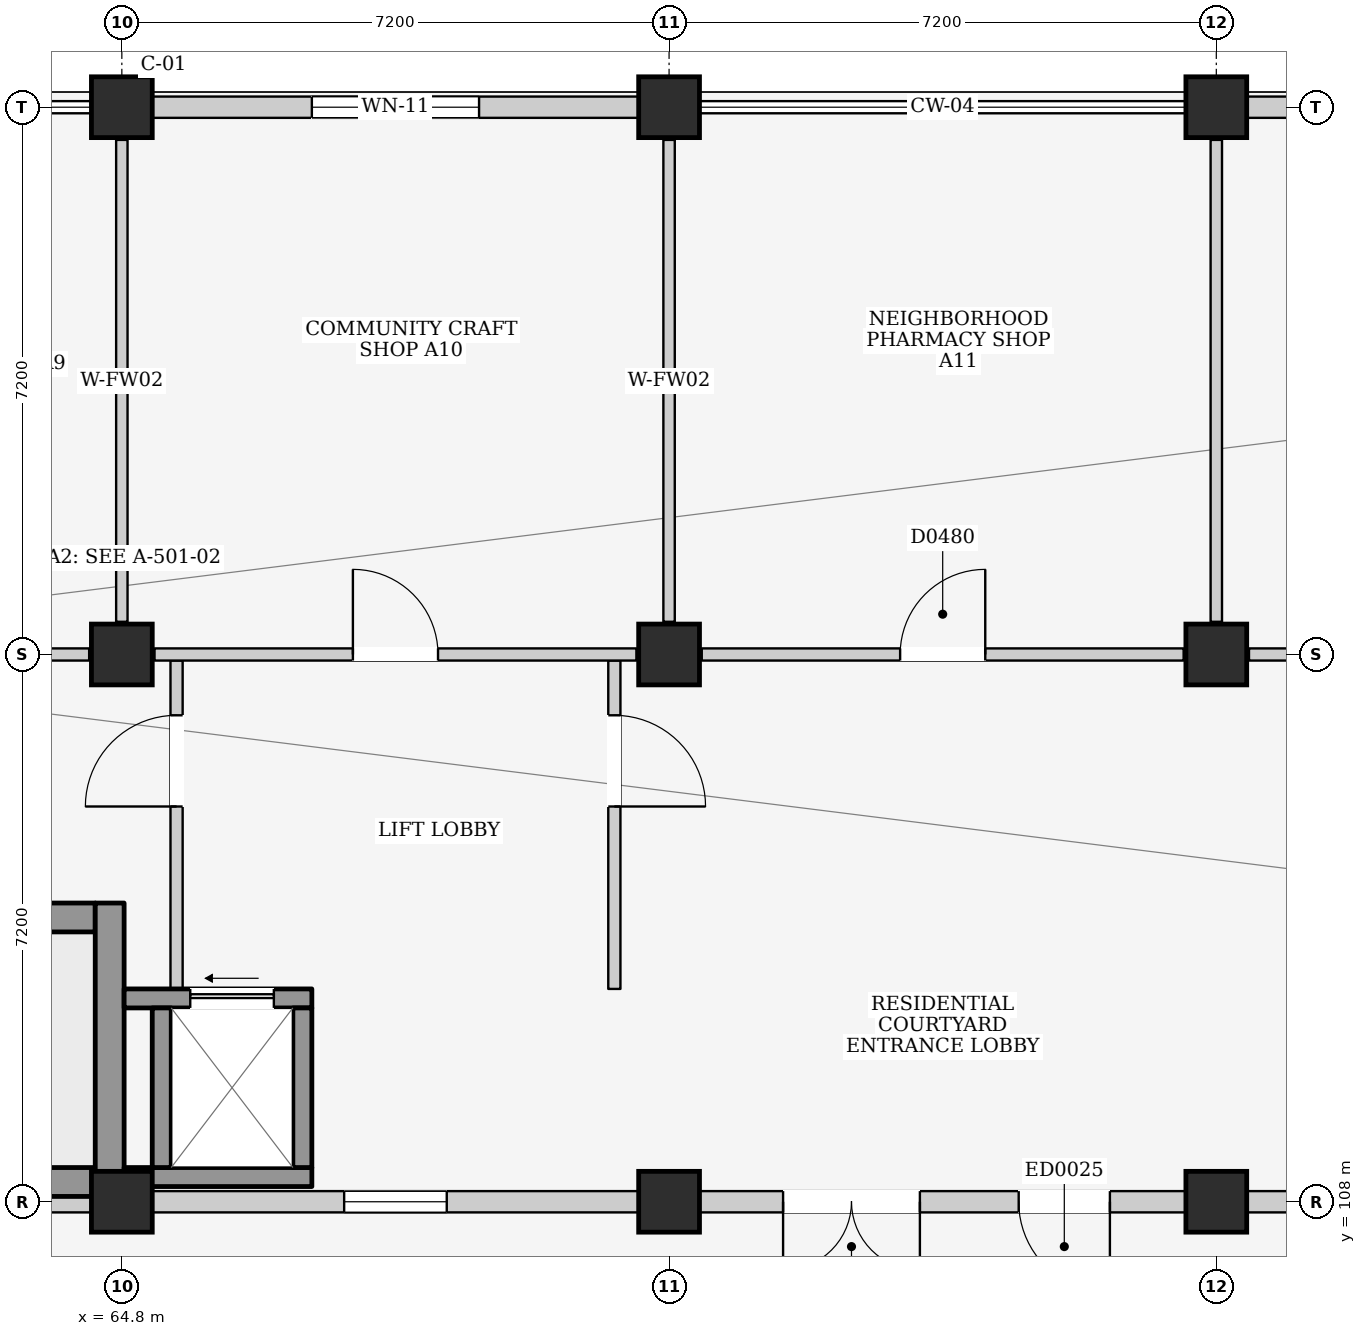
"""IFC4 building model, lengths in metres.
Left out: names, types, materials, properties, quantities, classifications, styles, units other than length and angle.
Written with IfcOpenShell. Run it as: python <this file> out.ifc"""

import sys

from ifc_helpers import new_model, si_unit, direction, frame, frame_2d, origin, origin_2d, place, context, subcontext, project, spatial, rectangle, extrude, element, fill, save


model = new_model("IFC4")
c1 = context("Model", 3, precision=1e-05, world=origin(), true_north=direction((0.0, 1.0)))
c2 = subcontext(c1, "Body", "Model", "MODEL_VIEW")
j1 = project(units=[si_unit("LENGTHUNIT", "METRE"), si_unit("PLANEANGLEUNIT", "RADIAN")], contexts=[c1])
p1 = place(None, origin())
s1 = spatial("IfcSite", under=j1, at=p1, CompositionType="ELEMENT")
p2 = place(p1, origin())
s2 = spatial("IfcBuilding", under=s1, at=p2, CompositionType="ELEMENT")
p3 = place(p2, origin())
s3 = spatial("IfcBuildingStorey", under=s2, at=p3, CompositionType="ELEMENT", Elevation=0.0)
for number, where, z_axis, x_axis in (
    (1, (64.8, 108.0, 0.0), (0.0, 0.0, 1.0), (1.0, 0.0, 0.0)),
    (2, (64.8, 115.2, 0.0), (0.0, 0.0, 1.0), (1.0, 0.0, 0.0)),
    (3, (64.8, 122.4, 0.0), (0.0, 0.0, 1.0), (1.0, 0.0, 0.0)),
    (4, (72.0, 108.0, 0.0), (0.0, 0.0, 1.0), (1.0, 0.0, 0.0)),
    (5, (72.0, 115.2, 0.0), (0.0, 0.0, 1.0), (1.0, 0.0, 0.0)),
    (6, (72.0, 122.4, 0.0), (0.0, 0.0, 1.0), (1.0, 0.0, 0.0)),
    (7, (79.2, 108.0, 0.0), (0.0, 0.0, 1.0), (1.0, 0.0, 0.0)),
    (8, (79.2, 115.2, 0.0), (0.0, 0.0, 1.0), (1.0, 0.0, 0.0)),
    (9, (79.2, 122.4, 0.0), (0.0, 0.0, 1.0), (1.0, 0.0, 0.0)),
):
    element("IfcColumn", number, at=place(p3, frame(where, z_axis=z_axis, x_axis=x_axis)), inside=s3, PredefinedType="COLUMN", context=c2, shape_type="SweptSolid", body=[
        extrude(rectangle(XDim=0.8, YDim=0.8, at=origin_2d()), origin(), (0.0, 0.0, 1.0), 4.5),
    ])
p4 = place(p3, frame((58.0, 108.0, 0.0), z_axis=(0.0, 0.0, 1.0), x_axis=(1.0, 0.0, 0.0)))
e10 = element("IfcWall", 10, at=p4, inside=s3, PredefinedType="ELEMENTEDWALL", context=c2, shape_type="SweptSolid", body=[
    extrude(rectangle(XDim=6.4, YDim=0.28, at=frame_2d((3.2, 0.0))), origin(), (0.0, 0.0, 1.0), 3.435),
])
p5 = place(p4, frame((2.525, 0.0, 0.95)))
e11 = element("IfcOpeningElement", 11, at=p5, cuts=e10, PredefinedType="OPENING", context=c2, shape_type="SweptSolid", body=[
    extrude(rectangle(XDim=1.35, YDim=1.5, at=frame_2d((0.675, 0.75))), frame((0.0, 0.155, 0.0), z_axis=(0.0, -1.0, 0.0), x_axis=(1.0, 0.0, 0.0)), (0.0, 0.0, 1.0), 0.31),
])
p6 = place(p3, frame((65.2, 122.4, 0.0), z_axis=(0.0, 0.0, 1.0), x_axis=(1.0, 0.0, 0.0)))
e12 = element("IfcWall", 12, at=p6, inside=s3, PredefinedType="ELEMENTEDWALL", context=c2, shape_type="SweptSolid", body=[
    extrude(rectangle(XDim=6.4, YDim=0.28, at=frame_2d((3.2, 0.0))), origin(), (0.0, 0.0, 1.0), 3.665),
])
p7 = place(p6, frame((2.1, 0.0, 0.85)))
e13 = element("IfcOpeningElement", 13, at=p7, cuts=e12, PredefinedType="OPENING", context=c2, shape_type="SweptSolid", body=[
    extrude(rectangle(XDim=2.2, YDim=1.8, at=frame_2d((1.1, 0.9))), frame((0.0, 0.155, 0.0), z_axis=(0.0, -1.0, 0.0), x_axis=(1.0, 0.0, 0.0)), (0.0, 0.0, 1.0), 0.31),
])
p8 = place(p3, frame((65.2, 108.0, 0.0), z_axis=(0.0, 0.0, 1.0), x_axis=(1.0, 0.0, 0.0)))
e14 = element("IfcWall", 14, at=p8, inside=s3, PredefinedType="ELEMENTEDWALL", context=c2, shape_type="SweptSolid", body=[
    extrude(rectangle(XDim=6.4, YDim=0.28, at=frame_2d((3.2, 0.0))), origin(), (0.0, 0.0, 1.0), 3.435),
])
p9 = place(p8, frame((2.525, 0.0, 0.95)))
e15 = element("IfcOpeningElement", 15, at=p9, cuts=e14, PredefinedType="OPENING", context=c2, shape_type="SweptSolid", body=[
    extrude(rectangle(XDim=1.35, YDim=1.5, at=frame_2d((0.675, 0.75))), frame((0.0, 0.155, 0.0), z_axis=(0.0, -1.0, 0.0), x_axis=(1.0, 0.0, 0.0)), (0.0, 0.0, 1.0), 0.31),
])
p10 = place(p3, frame((72.4, 108.0, 0.0), z_axis=(0.0, 0.0, 1.0), x_axis=(1.0, 0.0, 0.0)))
e16 = element("IfcWall", 16, at=p10, inside=s3, PredefinedType="ELEMENTEDWALL", context=c2, shape_type="SweptSolid", body=[
    extrude(rectangle(XDim=6.4, YDim=0.28, at=frame_2d((3.2, 0.0))), origin(), (0.0, 0.0, 1.0), 3.435),
])
p11 = place(p10, frame((1.1, 0.0, 0.0)))
e17 = element("IfcOpeningElement", 17, at=p11, cuts=e16, PredefinedType="OPENING", context=c2, shape_type="SweptSolid", body=[
    extrude(rectangle(XDim=1.8, YDim=2.4, at=frame_2d((0.9, 1.2))), frame((0.0, 0.155, 0.0), z_axis=(0.0, -1.0, 0.0), x_axis=(1.0, 0.0, 0.0)), (0.0, 0.0, 1.0), 0.31),
])
p12 = place(p10, frame((4.2, 0.0, 0.0)))
e18 = element("IfcOpeningElement", 18, at=p12, cuts=e16, PredefinedType="OPENING", context=c2, shape_type="SweptSolid", body=[
    extrude(rectangle(XDim=1.2, YDim=2.15, at=frame_2d((0.6, 1.075))), frame((0.0, 0.155, 0.0), z_axis=(0.0, -1.0, 0.0), x_axis=(1.0, 0.0, 0.0)), (0.0, 0.0, 1.0), 0.31),
])
p13 = place(p3, frame((79.6, 122.4, 0.0), z_axis=(0.0, 0.0, 1.0), x_axis=(1.0, 0.0, 0.0)))
e19 = element("IfcWall", 19, at=p13, inside=s3, PredefinedType="ELEMENTEDWALL", context=c2, shape_type="SweptSolid", body=[
    extrude(rectangle(XDim=6.4, YDim=0.28, at=frame_2d((3.2, 0.0))), origin(), (0.0, 0.0, 1.0), 3.665),
])
p14 = place(p13, frame((2.1, 0.0, 0.85)))
e20 = element("IfcOpeningElement", 20, at=p14, cuts=e19, PredefinedType="OPENING", context=c2, shape_type="SweptSolid", body=[
    extrude(rectangle(XDim=2.2, YDim=1.8, at=frame_2d((1.1, 0.9))), frame((0.0, 0.155, 0.0), z_axis=(0.0, -1.0, 0.0), x_axis=(1.0, 0.0, 0.0)), (0.0, 0.0, 1.0), 0.31),
])
p15 = place(p3, frame((79.6, 108.0, 0.0), z_axis=(0.0, 0.0, 1.0), x_axis=(1.0, 0.0, 0.0)))
e21 = element("IfcWall", 21, at=p15, inside=s3, PredefinedType="ELEMENTEDWALL", context=c2, shape_type="SweptSolid", body=[
    extrude(rectangle(XDim=6.4, YDim=0.28, at=frame_2d((3.2, 0.0))), origin(), (0.0, 0.0, 1.0), 3.435),
])
p16 = place(p15, frame((2.525, 0.0, 0.95)))
e22 = element("IfcOpeningElement", 22, at=p16, cuts=e21, PredefinedType="OPENING", context=c2, shape_type="SweptSolid", body=[
    extrude(rectangle(XDim=1.35, YDim=1.5, at=frame_2d((0.675, 0.75))), frame((0.0, 0.155, 0.0), z_axis=(0.0, -1.0, 0.0), x_axis=(1.0, 0.0, 0.0)), (0.0, 0.0, 1.0), 0.31),
])
p17 = place(p3, frame((57.95, 108.26, 0.0), z_axis=(0.0, 0.0, 1.0), x_axis=(1.0, 0.0, 0.0)))
e23 = element("IfcWall", 23, at=p17, inside=s3, PredefinedType="SHEAR", context=c2, shape_type="SweptSolid", body=[
    extrude(rectangle(XDim=6.5, YDim=0.38, at=frame_2d((3.25, 0.0))), origin(), (0.0, 0.0, 1.0), 4.2),
])
p18 = place(p3, frame((57.95, 111.74, 0.0), z_axis=(0.0, 0.0, 1.0), x_axis=(1.0, 0.0, 0.0)))
e24 = element("IfcWall", 24, at=p18, inside=s3, PredefinedType="SHEAR", context=c2, shape_type="SweptSolid", body=[
    extrude(rectangle(XDim=6.5, YDim=0.38, at=frame_2d((3.25, 0.0))), origin(), (0.0, 0.0, 1.0), 4.2),
])
p19 = place(p18, frame((0.18, 0.0, 0.0)))
e25 = element("IfcOpeningElement", 25, at=p19, cuts=e24, PredefinedType="OPENING", context=c2, shape_type="SweptSolid", body=[
    extrude(rectangle(XDim=1.15, YDim=2.2, at=frame_2d((0.575, 1.1))), frame((0.0, 0.205, 0.0), z_axis=(0.0, -1.0, 0.0), x_axis=(1.0, 0.0, 0.0)), (0.0, 0.0, 1.0), 0.41),
])
p20 = place(p3, frame((64.64, 108.07, 0.0), z_axis=(0.0, 0.0, 1.0), x_axis=(0.0, 1.0, 0.0)))
e26 = element("IfcWall", 26, at=p20, inside=s3, PredefinedType="SHEAR", context=c2, shape_type="SweptSolid", body=[
    extrude(rectangle(XDim=3.86, YDim=0.38, at=frame_2d((1.93, 0.0))), origin(), (0.0, 0.0, 1.0), 4.2),
])
p21 = place(p3, frame((65.52, 110.8, 0.0), z_axis=(0.0, 0.0, 1.0), x_axis=(0.0, 1.0, 0.0)))
e27 = element("IfcWall", 27, at=p21, inside=s3, PredefinedType="PARTITIONING", context=c2, shape_type="SweptSolid", body=[
    extrude(rectangle(XDim=4.32, YDim=0.16, at=frame_2d((2.16, 0.0))), origin(), (0.0, 0.0, 1.0), 4.2),
])
p22 = place(p21, frame((2.4, 0.0, 0.0)))
e28 = element("IfcOpeningElement", 28, at=p22, cuts=e27, PredefinedType="OPENING", context=c2, shape_type="SweptSolid", body=[
    extrude(rectangle(XDim=1.2, YDim=2.2, at=frame_2d((0.6, 1.1))), frame((0.0, 0.095, 0.0), z_axis=(0.0, -1.0, 0.0), x_axis=(1.0, 0.0, 0.0)), (0.0, 0.0, 1.0), 0.19),
])
p23 = place(p3, frame((71.28, 110.8, 0.0), z_axis=(0.0, 0.0, 1.0), x_axis=(0.0, 1.0, 0.0)))
e29 = element("IfcWall", 29, at=p23, inside=s3, PredefinedType="PARTITIONING", context=c2, shape_type="SweptSolid", body=[
    extrude(rectangle(XDim=4.32, YDim=0.16, at=frame_2d((2.16, 0.0))), origin(), (0.0, 0.0, 1.0), 4.2),
])
p24 = place(p23, frame((2.4, 0.0, 0.0)))
e30 = element("IfcOpeningElement", 30, at=p24, cuts=e29, PredefinedType="OPENING", context=c2, shape_type="SweptSolid", body=[
    extrude(rectangle(XDim=1.2, YDim=2.2, at=frame_2d((0.6, 1.1))), frame((0.0, 0.095, 0.0), z_axis=(0.0, -1.0, 0.0), x_axis=(1.0, 0.0, 0.0)), (0.0, 0.0, 1.0), 0.19),
])
p25 = place(p3, frame((64.83, 108.325, 0.0), z_axis=(0.0, 0.0, 1.0), x_axis=(1.0, 0.0, 0.0)))
e31 = element("IfcWall", 31, at=p25, inside=s3, PredefinedType="SHEAR", context=c2, shape_type="SweptSolid", body=[
    extrude(rectangle(XDim=2.47, YDim=0.25, at=frame_2d((1.235, 0.0))), origin(), (0.0, 0.0, 1.0), 4.2),
])
p26 = place(p3, frame((64.83, 110.675, 0.0), z_axis=(0.0, 0.0, 1.0), x_axis=(1.0, 0.0, 0.0)))
e32 = element("IfcWall", 32, at=p26, inside=s3, PredefinedType="SHEAR", context=c2, shape_type="SweptSolid", body=[
    extrude(rectangle(XDim=2.47, YDim=0.25, at=frame_2d((1.235, 0.0))), origin(), (0.0, 0.0, 1.0), 4.2),
])
p27 = place(p26, frame((0.87, 0.0, 0.0)))
e33 = element("IfcOpeningElement", 33, at=p27, cuts=e32, PredefinedType="OPENING", context=c2, shape_type="SweptSolid", body=[
    extrude(rectangle(XDim=1.1, YDim=2.15, at=frame_2d((0.55, 1.075))), frame((0.0, 0.14, 0.0), z_axis=(0.0, -1.0, 0.0), x_axis=(1.0, 0.0, 0.0)), (0.0, 0.0, 1.0), 0.28),
])
for number, where, z_axis, x_axis in (
    (34, (65.325, 108.45, 0.0), (0.0, 0.0, 1.0), (0.0, 1.0, 0.0)),
    (35, (67.175, 108.45, 0.0), (0.0, 0.0, 1.0), (0.0, 1.0, 0.0)),
):
    element("IfcWall", number, at=place(p3, frame(where, z_axis=z_axis, x_axis=x_axis)), inside=s3, PredefinedType="SHEAR", context=c2, shape_type="SweptSolid", body=[
        extrude(rectangle(XDim=2.1, YDim=0.25, at=frame_2d((1.05, 0.0))), origin(), (0.0, 0.0, 1.0), 4.2),
    ])
p28 = place(p3, frame((58.03, 115.2, 0.0), z_axis=(0.0, 0.0, 1.0), x_axis=(1.0, 0.0, 0.0)))
e36 = element("IfcWall", 36, at=p28, inside=s3, PredefinedType="PARTITIONING", context=c2, shape_type="SweptSolid", body=[
    extrude(rectangle(XDim=6.34, YDim=0.16, at=frame_2d((3.17, 0.0))), origin(), (0.0, 0.0, 1.0), 3.435),
])
p29 = place(p28, frame((2.61, 0.0, 0.0)))
e37 = element("IfcOpeningElement", 37, at=p29, cuts=e36, PredefinedType="OPENING", context=c2, shape_type="SweptSolid", body=[
    extrude(rectangle(XDim=1.12, YDim=2.2, at=frame_2d((0.56, 1.1))), frame((0.0, 0.095, 0.0), z_axis=(0.0, -1.0, 0.0), x_axis=(1.0, 0.0, 0.0)), (0.0, 0.0, 1.0), 0.19),
])
p30 = place(p3, frame((64.8, 115.63, 0.0), z_axis=(0.0, 0.0, 1.0), x_axis=(0.0, 1.0, 0.0)))
e38 = element("IfcWall", 38, at=p30, inside=s3, PredefinedType="PARTITIONING", context=c2, shape_type="SweptSolid", body=[
    extrude(rectangle(XDim=6.34, YDim=0.15, at=frame_2d((3.17, 0.0))), origin(), (0.0, 0.0, 1.0), 3.435),
])
p31 = place(p3, frame((65.23, 115.2, 0.0), z_axis=(0.0, 0.0, 1.0), x_axis=(1.0, 0.0, 0.0)))
e39 = element("IfcWall", 39, at=p31, inside=s3, PredefinedType="PARTITIONING", context=c2, shape_type="SweptSolid", body=[
    extrude(rectangle(XDim=6.34, YDim=0.16, at=frame_2d((3.17, 0.0))), origin(), (0.0, 0.0, 1.0), 3.435),
])
p32 = place(p31, frame((2.61, 0.0, 0.0)))
e40 = element("IfcOpeningElement", 40, at=p32, cuts=e39, PredefinedType="OPENING", context=c2, shape_type="SweptSolid", body=[
    extrude(rectangle(XDim=1.12, YDim=2.2, at=frame_2d((0.56, 1.1))), frame((0.0, 0.095, 0.0), z_axis=(0.0, -1.0, 0.0), x_axis=(1.0, 0.0, 0.0)), (0.0, 0.0, 1.0), 0.19),
])
p33 = place(p3, frame((72.0, 115.63, 0.0), z_axis=(0.0, 0.0, 1.0), x_axis=(0.0, 1.0, 0.0)))
e41 = element("IfcWall", 41, at=p33, inside=s3, PredefinedType="PARTITIONING", context=c2, shape_type="SweptSolid", body=[
    extrude(rectangle(XDim=6.34, YDim=0.15, at=frame_2d((3.17, 0.0))), origin(), (0.0, 0.0, 1.0), 3.435),
])
p34 = place(p3, frame((72.43, 115.2, 0.0), z_axis=(0.0, 0.0, 1.0), x_axis=(1.0, 0.0, 0.0)))
e42 = element("IfcWall", 42, at=p34, inside=s3, PredefinedType="PARTITIONING", context=c2, shape_type="SweptSolid", body=[
    extrude(rectangle(XDim=6.34, YDim=0.16, at=frame_2d((3.17, 0.0))), origin(), (0.0, 0.0, 1.0), 3.435),
])
p35 = place(p34, frame((2.61, 0.0, 0.0)))
e43 = element("IfcOpeningElement", 43, at=p35, cuts=e42, PredefinedType="OPENING", context=c2, shape_type="SweptSolid", body=[
    extrude(rectangle(XDim=1.12, YDim=2.2, at=frame_2d((0.56, 1.1))), frame((0.0, 0.095, 0.0), z_axis=(0.0, -1.0, 0.0), x_axis=(1.0, 0.0, 0.0)), (0.0, 0.0, 1.0), 0.19),
])
p36 = place(p3, frame((79.2, 115.63, 0.0), z_axis=(0.0, 0.0, 1.0), x_axis=(0.0, 1.0, 0.0)))
e44 = element("IfcWall", 44, at=p36, inside=s3, PredefinedType="PARTITIONING", context=c2, shape_type="SweptSolid", body=[
    extrude(rectangle(XDim=6.34, YDim=0.15, at=frame_2d((3.17, 0.0))), origin(), (0.0, 0.0, 1.0), 3.435),
])
p37 = place(p3, frame((79.63, 115.2, 0.0), z_axis=(0.0, 0.0, 1.0), x_axis=(1.0, 0.0, 0.0)))
e45 = element("IfcWall", 45, at=p37, inside=s3, PredefinedType="PARTITIONING", context=c2, shape_type="SweptSolid", body=[
    extrude(rectangle(XDim=6.34, YDim=0.16, at=frame_2d((3.17, 0.0))), origin(), (0.0, 0.0, 1.0), 3.435),
])
p38 = place(p37, frame((2.61, 0.0, 0.0)))
e46 = element("IfcOpeningElement", 46, at=p38, cuts=e45, PredefinedType="OPENING", context=c2, shape_type="SweptSolid", body=[
    extrude(rectangle(XDim=1.12, YDim=2.2, at=frame_2d((0.56, 1.1))), frame((0.0, 0.095, 0.0), z_axis=(0.0, -1.0, 0.0), x_axis=(1.0, 0.0, 0.0)), (0.0, 0.0, 1.0), 0.19),
])
p39 = place(p7, origin())
e47 = element("IfcWindow", 47, at=p39, inside=s3, PartitioningType="TRIPLE_PANEL_VERTICAL", PredefinedType="WINDOW", context=c2, shape_type="SweptSolid", body=[
    extrude(rectangle(XDim=2.2, YDim=1.8, at=frame_2d((1.1, 0.9))), frame((0.0, 0.03, 0.0), z_axis=(0.0, -1.0, 0.0), x_axis=(1.0, 0.0, 0.0)), (0.0, 0.0, 1.0), 0.06),
])
fill(e13, e47)
p40 = place(p9, origin())
e48 = element("IfcWindow", 48, at=p40, inside=s3, PartitioningType="SINGLE_PANEL", PredefinedType="WINDOW", context=c2, shape_type="SweptSolid", body=[
    extrude(rectangle(XDim=1.35, YDim=1.5, at=frame_2d((0.675, 0.75))), frame((0.0, 0.03, 0.0), z_axis=(0.0, -1.0, 0.0), x_axis=(1.0, 0.0, 0.0)), (0.0, 0.0, 1.0), 0.06),
])
fill(e15, e48)
p41 = place(p11, frame((1.8, 0.0, 0.0), z_axis=(0.0, 0.0, 1.0), x_axis=(-1.0, 0.0, 0.0)))
e49 = element("IfcDoor", 49, at=p41, inside=s3, OperationType="DOUBLE_DOOR_SINGLE_SWING", PredefinedType="DOOR", context=c2, shape_type="SweptSolid", body=[
    extrude(rectangle(XDim=1.8, YDim=2.4, at=frame_2d((0.9, 1.2))), frame((0.0, 0.025, 0.0), z_axis=(0.0, -1.0, 0.0), x_axis=(1.0, 0.0, 0.0)), (0.0, 0.0, 1.0), 0.05),
])
fill(e17, e49)
p42 = place(p12, frame((1.2, 0.0, 0.0), z_axis=(0.0, 0.0, 1.0), x_axis=(-1.0, 0.0, 0.0)))
e50 = element("IfcDoor", 50, at=p42, inside=s3, OperationType="SINGLE_SWING_LEFT", PredefinedType="DOOR", context=c2, shape_type="SweptSolid", body=[
    extrude(rectangle(XDim=1.2, YDim=2.15, at=frame_2d((0.6, 1.075))), frame((0.0, 0.025, 0.0), z_axis=(0.0, -1.0, 0.0), x_axis=(1.0, 0.0, 0.0)), (0.0, 0.0, 1.0), 0.05),
])
fill(e18, e50)
p43 = place(p22, origin())
e51 = element("IfcDoor", 51, at=p43, inside=s3, OperationType="SINGLE_SWING_LEFT", PredefinedType="DOOR", context=c2, shape_type="SweptSolid", body=[
    extrude(rectangle(XDim=1.2, YDim=2.2, at=frame_2d((0.6, 1.1))), frame((0.0, 0.025, 0.0), z_axis=(0.0, -1.0, 0.0), x_axis=(1.0, 0.0, 0.0)), (0.0, 0.0, 1.0), 0.05),
])
fill(e28, e51)
p44 = place(p24, frame((1.2, 0.0, 0.0), z_axis=(0.0, 0.0, 1.0), x_axis=(-1.0, 0.0, 0.0)))
e52 = element("IfcDoor", 52, at=p44, inside=s3, OperationType="SINGLE_SWING_RIGHT", PredefinedType="DOOR", context=c2, shape_type="SweptSolid", body=[
    extrude(rectangle(XDim=1.2, YDim=2.2, at=frame_2d((0.6, 1.1))), frame((0.0, 0.025, 0.0), z_axis=(0.0, -1.0, 0.0), x_axis=(1.0, 0.0, 0.0)), (0.0, 0.0, 1.0), 0.05),
])
fill(e30, e52)
p45 = place(p27, origin())
e53 = element("IfcDoor", 53, at=p45, inside=s3, OperationType="SLIDING_TO_LEFT", PredefinedType="DOOR", context=c2, shape_type="SweptSolid", body=[
    extrude(rectangle(XDim=1.1, YDim=2.15, at=frame_2d((0.55, 1.075))), frame((0.0, 0.025, 0.0), z_axis=(0.0, -1.0, 0.0), x_axis=(1.0, 0.0, 0.0)), (0.0, 0.0, 1.0), 0.05),
])
fill(e33, e53)
p46 = place(p32, origin())
e54 = element("IfcDoor", 54, at=p46, inside=s3, OperationType="SINGLE_SWING_LEFT", PredefinedType="DOOR", context=c2, shape_type="SweptSolid", body=[
    extrude(rectangle(XDim=1.12, YDim=2.2, at=frame_2d((0.56, 1.1))), frame((0.0, 0.025, 0.0), z_axis=(0.0, -1.0, 0.0), x_axis=(1.0, 0.0, 0.0)), (0.0, 0.0, 1.0), 0.05),
])
fill(e40, e54)
p47 = place(p35, origin())
e55 = element("IfcDoor", 55, at=p47, inside=s3, OperationType="SINGLE_SWING_RIGHT", PredefinedType="DOOR", context=c2, shape_type="SweptSolid", body=[
    extrude(rectangle(XDim=1.12, YDim=2.2, at=frame_2d((0.56, 1.1))), frame((0.0, 0.025, 0.0), z_axis=(0.0, -1.0, 0.0), x_axis=(1.0, 0.0, 0.0)), (0.0, 0.0, 1.0), 0.05),
])
fill(e43, e55)
save(model, sys.argv[1])
